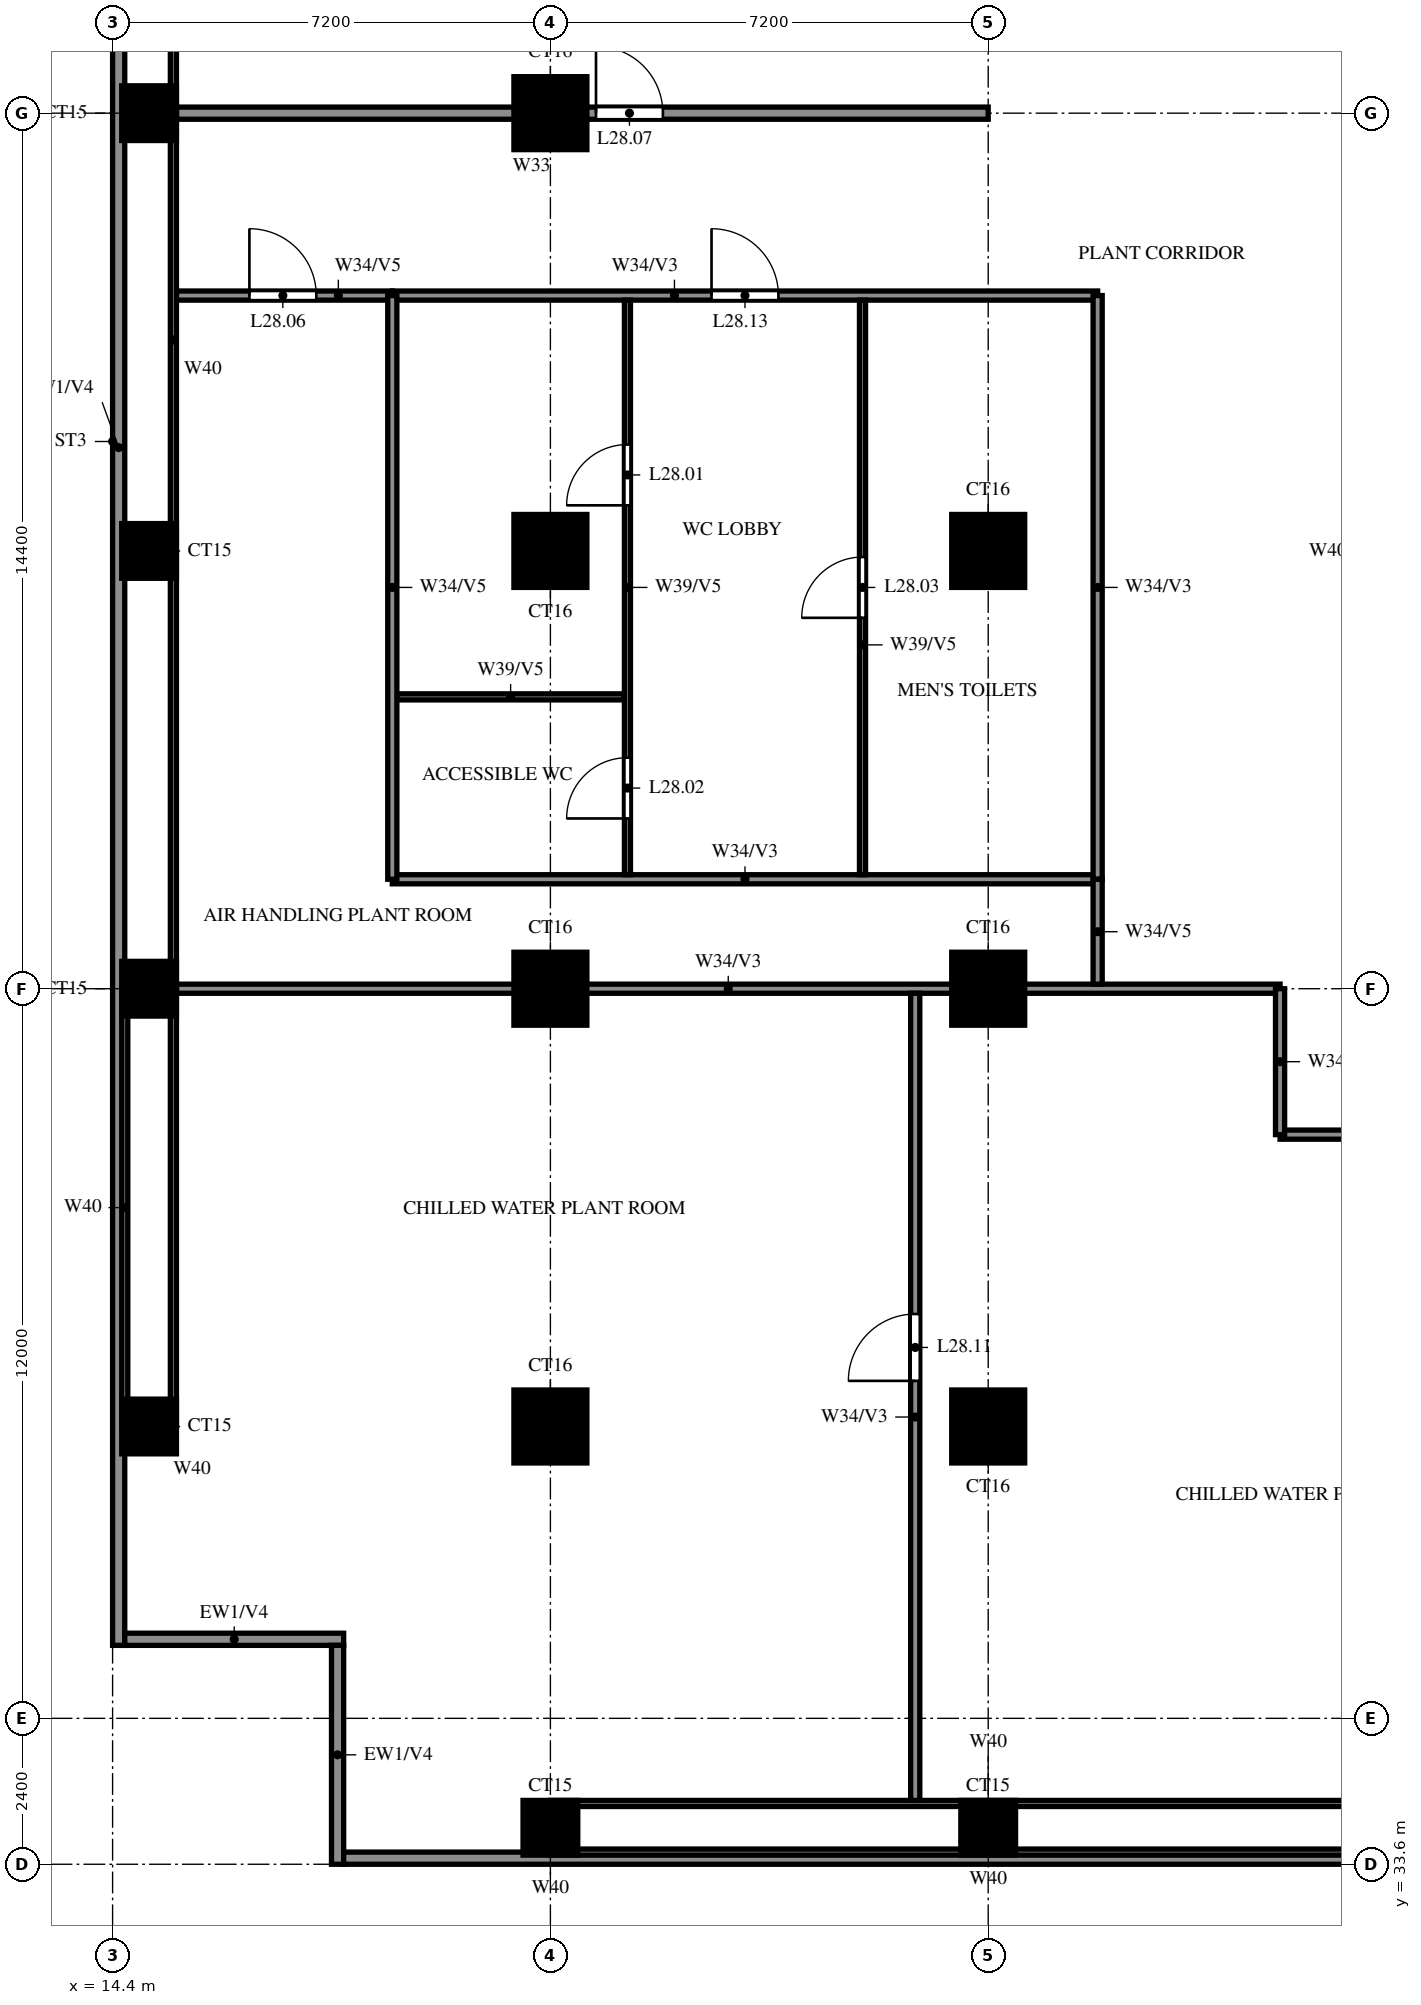
"""IFC4 building model, lengths in metres.
Left out: names, types, materials, properties, quantities, classifications, styles, units other than length and angle.
Written with IfcOpenShell. Run it as: python <this file> out.ifc"""

import sys

from ifc_helpers import new_model, si_unit, direction, frame, frame_2d, origin, origin_2d, place, context, subcontext, project, spatial, rectangle, extrude, source, transform, mapped, element, fill, save


model = new_model("IFC4")
c1 = context("Model", 3, precision=1e-05, world=origin(), true_north=direction((0.0, 1.0)))
c2 = subcontext(c1, "Body", "Model", "MODEL_VIEW")
j1 = project(units=[si_unit("LENGTHUNIT", "METRE"), si_unit("PLANEANGLEUNIT", "RADIAN")], contexts=[c1])
p1 = place(None, origin())
s1 = spatial("IfcSite", under=j1, at=p1, CompositionType="ELEMENT")
p2 = place(p1, origin())
s2 = spatial("IfcBuilding", under=s1, at=p2, CompositionType="ELEMENT")
p3 = place(p2, frame((0.0, 0.0, 107.5)))
s3 = spatial("IfcBuildingStorey", under=s2, at=p3, CompositionType="ELEMENT", Elevation=107.5)
m1 = source(origin(), c2, "Body", "SweptSolid", [
    extrude(rectangle(XDim=0.9, YDim=0.9, at=origin_2d()), origin(), (0.0, 0.0, 1.0), 5.2),
])
for number, where, z_axis, x_axis in (
    (1, (21.6, 34.2, 0.0), (0.0, 0.0, 1.0), (1.0, 0.0, 0.0)),
    (2, (28.8, 34.2, 0.0), (0.0, 0.0, 1.0), (1.0, 0.0, 0.0)),
    (3, (15.0, 40.8, 0.0), (0.0, 0.0, 1.0), (1.0, 0.0, 0.0)),
):
    element("IfcColumn", number, at=place(p3, frame(where, z_axis=z_axis, x_axis=x_axis)), inside=s3, PredefinedType="COLUMN", context=c2, shape_type="MappedRepresentation", body=[
        mapped(m1, transform((0.0, 0.0, 0.0))),
    ])
m2 = source(origin(), c2, "Body", "SweptSolid", [
    extrude(rectangle(XDim=1.2, YDim=1.2, at=origin_2d()), origin(), (0.0, 0.0, 1.0), 5.2),
])
for number, where, z_axis, x_axis in (
    (4, (21.6, 40.8, 0.0), (0.0, 0.0, 1.0), (1.0, 0.0, 0.0)),
    (5, (28.8, 40.8, 0.0), (0.0, 0.0, 1.0), (1.0, 0.0, 0.0)),
):
    element("IfcColumn", number, at=place(p3, frame(where, z_axis=z_axis, x_axis=x_axis)), inside=s3, PredefinedType="COLUMN", context=c2, shape_type="MappedRepresentation", body=[
        mapped(m2, transform((0.0, 0.0, 0.0))),
    ])
p4 = place(p3, frame((15.0, 48.0, 0.0), z_axis=(0.0, 0.0, 1.0), x_axis=(1.0, 0.0, 0.0)))
e6 = element("IfcColumn", 6, at=p4, inside=s3, PredefinedType="COLUMN", context=c2, shape_type="MappedRepresentation", body=[
    mapped(m1, transform((0.0, 0.0, 0.0))),
])
for number, where, z_axis, x_axis in (
    (7, (21.6, 48.0, 0.0), (0.0, 0.0, 1.0), (1.0, 0.0, 0.0)),
    (8, (28.8, 48.0, 0.0), (0.0, 0.0, 1.0), (1.0, 0.0, 0.0)),
):
    element("IfcColumn", number, at=place(p3, frame(where, z_axis=z_axis, x_axis=x_axis)), inside=s3, PredefinedType="COLUMN", context=c2, shape_type="MappedRepresentation", body=[
        mapped(m2, transform((0.0, 0.0, 0.0))),
    ])
p5 = place(p3, frame((15.0, 55.2, 0.0), z_axis=(0.0, 0.0, 1.0), x_axis=(1.0, 0.0, 0.0)))
e9 = element("IfcColumn", 9, at=p5, inside=s3, PredefinedType="COLUMN", context=c2, shape_type="MappedRepresentation", body=[
    mapped(m1, transform((0.0, 0.0, 0.0))),
])
for number, where, z_axis, x_axis in (
    (10, (21.6, 55.2, 0.0), (0.0, 0.0, 1.0), (1.0, 0.0, 0.0)),
    (11, (28.8, 55.2, 0.0), (0.0, 0.0, 1.0), (1.0, 0.0, 0.0)),
):
    element("IfcColumn", number, at=place(p3, frame(where, z_axis=z_axis, x_axis=x_axis)), inside=s3, PredefinedType="COLUMN", context=c2, shape_type="MappedRepresentation", body=[
        mapped(m2, transform((0.0, 0.0, 0.0))),
    ])
p6 = place(p3, frame((15.0, 62.4, 0.0), z_axis=(0.0, 0.0, 1.0), x_axis=(1.0, 0.0, 0.0)))
e12 = element("IfcColumn", 12, at=p6, inside=s3, PredefinedType="COLUMN", context=c2, shape_type="MappedRepresentation", body=[
    mapped(m1, transform((0.0, 0.0, 0.0))),
])
p7 = place(p3, frame((21.6, 62.4, 0.0), z_axis=(0.0, 0.0, 1.0), x_axis=(1.0, 0.0, 0.0)))
e13 = element("IfcColumn", 13, at=p7, inside=s3, PredefinedType="COLUMN", context=c2, shape_type="MappedRepresentation", body=[
    mapped(m2, transform((0.0, 0.0, 0.0))),
])
p8 = place(p3, frame((14.5, 76.6, 0.0), z_axis=(0.0, 0.0, 1.0), x_axis=(0.0, -1.0, 0.0)))
e14 = element("IfcWall", 14, at=p8, inside=s3, PredefinedType="SOLIDWALL", context=c2, shape_type="SweptSolid", body=[
    extrude(rectangle(XDim=39.4, YDim=0.2, at=frame_2d((19.7, 0.0))), origin(), (0.0, 0.0, 1.0), 5.2),
])
for number, where, z_axis, x_axis in (
    (15, (14.6, 37.3, 0.0), (0.0, 0.0, 1.0), (1.0, 0.0, 0.0)),
    (16, (18.1, 37.2, 0.0), (0.0, 0.0, 1.0), (0.0, -1.0, 0.0)),
):
    element("IfcWall", number, at=place(p3, frame(where, z_axis=z_axis, x_axis=x_axis)), inside=s3, PredefinedType="SOLIDWALL", context=c2, shape_type="SweptSolid", body=[
        extrude(rectangle(XDim=3.6, YDim=0.2, at=frame_2d((1.8, 0.0))), origin(), (0.0, 0.0, 1.0), 5.2),
    ])
p9 = place(p3, frame((18.2, 33.7, 0.0), z_axis=(0.0, 0.0, 1.0), x_axis=(1.0, 0.0, 0.0)))
e17 = element("IfcWall", 17, at=p9, inside=s3, PredefinedType="SOLIDWALL", context=c2, shape_type="SweptSolid", body=[
    extrude(rectangle(XDim=23.8, YDim=0.2, at=frame_2d((11.9, 0.0))), origin(), (0.0, 0.0, 1.0), 5.2),
])
for number, where, z_axis, x_axis in (
    (18, (21.6, 33.8, 0.0), (0.0, 0.0, 1.0), (1.0, 0.0, 0.0)),
    (19, (21.6, 34.6, 0.0), (0.0, 0.0, 1.0), (1.0, 0.0, 0.0)),
):
    element("IfcWall", number, at=place(p3, frame(where, z_axis=z_axis, x_axis=x_axis)), inside=s3, PredefinedType="PARTITIONING", context=c2, shape_type="SweptSolid", body=[
        extrude(rectangle(XDim=14.4, YDim=0.1, at=frame_2d((7.2, 0.0))), origin(), (0.0, 0.0, 1.0), 5.2),
    ])
p10 = place(p3, frame((14.6, 40.8, 0.0), z_axis=(0.0, 0.0, 1.0), x_axis=(1.0, 0.0, 0.0)))
e20 = element("IfcWall", 20, at=p10, inside=s3, PredefinedType="PARTITIONING", context=c2, shape_type="SweptSolid", body=[
    extrude(rectangle(XDim=0.8, YDim=0.1, at=frame_2d((0.4, 0.0))), origin(), (0.0, 0.0, 1.0), 5.2),
])
p11 = place(p3, frame((33.6, 45.6, 0.0), z_axis=(0.0, 0.0, 1.0), x_axis=(1.0, 0.0, 0.0)))
e21 = element("IfcWall", 21, at=p11, inside=s3, PredefinedType="PARTITIONING", context=c2, shape_type="SweptSolid", body=[
    extrude(rectangle(XDim=7.2, YDim=0.15, at=frame_2d((3.6, 0.0))), origin(), (0.0, 0.0, 1.0), 4.3),
])
p12 = place(p3, frame((15.45, 48.0, 0.0), z_axis=(0.0, 0.0, 1.0), x_axis=(1.0, 0.0, 0.0)))
e22 = element("IfcWall", 22, at=p12, inside=s3, PredefinedType="PARTITIONING", context=c2, shape_type="SweptSolid", body=[
    extrude(rectangle(XDim=18.15, YDim=0.15, at=frame_2d((9.075, 0.0))), origin(), (0.0, 0.0, 1.0), 4.3),
])
p13 = place(p3, frame((19.0, 49.8, 0.0), z_axis=(0.0, 0.0, 1.0), x_axis=(1.0, 0.0, 0.0)))
e23 = element("IfcWall", 23, at=p13, inside=s3, PredefinedType="PARTITIONING", context=c2, shape_type="SweptSolid", body=[
    extrude(rectangle(XDim=11.6, YDim=0.15, at=frame_2d((5.8, 0.0))), origin(), (0.0, 0.0, 1.0), 4.3),
])
p14 = place(p3, frame((19.075, 52.8, 0.0), z_axis=(0.0, 0.0, 1.0), x_axis=(1.0, 0.0, 0.0)))
e24 = element("IfcWall", 24, at=p14, inside=s3, PredefinedType="PARTITIONING", context=c2, shape_type="SweptSolid", body=[
    extrude(rectangle(XDim=3.742, YDim=0.1, at=frame_2d((1.871, 0.0))), origin(), (0.0, 0.0, 1.0), 4.3),
])
p15 = place(p3, frame((19.0, 59.4, 0.0), z_axis=(0.0, 0.0, 1.0), x_axis=(1.0, 0.0, 0.0)))
e25 = element("IfcWall", 25, at=p15, inside=s3, PredefinedType="PARTITIONING", context=c2, shape_type="SweptSolid", body=[
    extrude(rectangle(XDim=11.6, YDim=0.15, at=frame_2d((5.8, 0.0))), origin(), (0.0, 0.0, 1.0), 4.3),
])
p16 = place(p15, frame((5.25, 0.0, 0.0)))
e26 = element("IfcOpeningElement", 26, at=p16, cuts=e25, PredefinedType="OPENING", context=c2, shape_type="SweptSolid", body=[
    extrude(rectangle(XDim=1.1, YDim=2.1, at=frame_2d((0.55, 1.05))), frame((0.0, 0.085, 0.0), z_axis=(0.0, -1.0, 0.0), x_axis=(1.0, 0.0, 0.0)), (0.0, 0.0, 1.0), 0.17),
])
p17 = place(p3, frame((15.45, 59.4, 0.0), z_axis=(0.0, 0.0, 1.0), x_axis=(1.0, 0.0, 0.0)))
e27 = element("IfcWall", 27, at=p17, inside=s3, PredefinedType="PARTITIONING", context=c2, shape_type="SweptSolid", body=[
    extrude(rectangle(XDim=3.55, YDim=0.15, at=frame_2d((1.775, 0.0))), origin(), (0.0, 0.0, 1.0), 5.2),
])
p18 = place(p17, frame((1.2, 0.0, 0.0)))
e28 = element("IfcOpeningElement", 28, at=p18, cuts=e27, PredefinedType="OPENING", context=c2, shape_type="SweptSolid", body=[
    extrude(rectangle(XDim=1.1, YDim=2.1, at=frame_2d((0.55, 1.05))), frame((0.0, 0.085, 0.0), z_axis=(0.0, -1.0, 0.0), x_axis=(1.0, 0.0, 0.0)), (0.0, 0.0, 1.0), 0.17),
])
p19 = place(p3, frame((15.45, 62.4, 0.0), z_axis=(0.0, 0.0, 1.0), x_axis=(1.0, 0.0, 0.0)))
e29 = element("IfcWall", 29, at=p19, inside=s3, PredefinedType="SOLIDWALL", context=c2, shape_type="SweptSolid", body=[
    extrude(rectangle(XDim=13.35, YDim=0.2, at=frame_2d((6.675, 0.0))), origin(), (0.0, 0.0, 1.0), 5.2),
])
p20 = place(p19, frame((6.9, 0.0, 0.0)))
e30 = element("IfcOpeningElement", 30, at=p20, cuts=e29, PredefinedType="OPENING", context=c2, shape_type="SweptSolid", body=[
    extrude(rectangle(XDim=1.1, YDim=2.1, at=frame_2d((0.55, 1.05))), frame((0.0, 0.11, 0.0), z_axis=(0.0, -1.0, 0.0), x_axis=(1.0, 0.0, 0.0)), (0.0, 0.0, 1.0), 0.22),
])
p21 = place(p3, frame((14.6, 40.8, 0.0), z_axis=(0.0, 0.0, 1.0), x_axis=(0.0, 1.0, 0.0)))
e31 = element("IfcWall", 31, at=p21, inside=s3, PredefinedType="PARTITIONING", context=c2, shape_type="SweptSolid", body=[
    extrude(rectangle(XDim=7.2, YDim=0.1, at=frame_2d((3.6, 0.0))), origin(), (0.0, 0.0, 1.0), 5.2),
])
p22 = place(p3, frame((15.4, 40.8, 0.0), z_axis=(0.0, 0.0, 1.0), x_axis=(0.0, 1.0, 0.0)))
e32 = element("IfcWall", 32, at=p22, inside=s3, PredefinedType="PARTITIONING", context=c2, shape_type="SweptSolid", body=[
    extrude(rectangle(XDim=35.742, YDim=0.1, at=frame_2d((17.871, 0.0))), origin(), (0.0, 0.0, 1.0), 5.2),
])
p23 = place(p3, frame((19.0, 49.8, 0.0), z_axis=(0.0, 0.0, 1.0), x_axis=(0.0, 1.0, 0.0)))
e33 = element("IfcWall", 33, at=p23, inside=s3, PredefinedType="PARTITIONING", context=c2, shape_type="SweptSolid", body=[
    extrude(rectangle(XDim=9.6, YDim=0.15, at=frame_2d((4.8, 0.0))), origin(), (0.0, 0.0, 1.0), 5.2),
])
p24 = place(p3, frame((21.6, 33.8, 0.0), z_axis=(0.0, 0.0, 1.0), x_axis=(0.0, 1.0, 0.0)))
e34 = element("IfcWall", 34, at=p24, inside=s3, PredefinedType="PARTITIONING", context=c2, shape_type="SweptSolid", body=[
    extrude(rectangle(XDim=0.8, YDim=0.1, at=frame_2d((0.4, 0.0))), origin(), (0.0, 0.0, 1.0), 5.2),
])
p25 = place(p3, frame((22.867, 49.875, 0.0), z_axis=(0.0, 0.0, 1.0), x_axis=(0.0, 1.0, 0.0)))
e35 = element("IfcWall", 35, at=p25, inside=s3, PredefinedType="PARTITIONING", context=c2, shape_type="SweptSolid", body=[
    extrude(rectangle(XDim=9.45, YDim=0.1, at=frame_2d((4.725, 0.0))), origin(), (0.0, 0.0, 1.0), 4.3),
])
p26 = place(p25, frame((6.075, 0.0, 0.0)))
e36 = element("IfcOpeningElement", 36, at=p26, cuts=e35, PredefinedType="OPENING", context=c2, shape_type="SweptSolid", body=[
    extrude(rectangle(XDim=1.0, YDim=2.1, at=frame_2d((0.5, 1.05))), frame((0.0, 0.06, 0.0), z_axis=(0.0, -1.0, 0.0), x_axis=(1.0, 0.0, 0.0)), (0.0, 0.0, 1.0), 0.12),
])
p27 = place(p25, frame((0.925, 0.0, 0.0)))
e37 = element("IfcOpeningElement", 37, at=p27, cuts=e35, PredefinedType="OPENING", context=c2, shape_type="SweptSolid", body=[
    extrude(rectangle(XDim=1.0, YDim=2.1, at=frame_2d((0.5, 1.05))), frame((0.0, 0.06, 0.0), z_axis=(0.0, -1.0, 0.0), x_axis=(1.0, 0.0, 0.0)), (0.0, 0.0, 1.0), 0.12),
])
p28 = place(p3, frame((26.733, 49.875, 0.0), z_axis=(0.0, 0.0, 1.0), x_axis=(0.0, 1.0, 0.0)))
e38 = element("IfcWall", 38, at=p28, inside=s3, PredefinedType="PARTITIONING", context=c2, shape_type="SweptSolid", body=[
    extrude(rectangle(XDim=9.45, YDim=0.1, at=frame_2d((4.725, 0.0))), origin(), (0.0, 0.0, 1.0), 4.3),
])
p29 = place(p28, frame((4.225, 0.0, 0.0)))
e39 = element("IfcOpeningElement", 39, at=p29, cuts=e38, PredefinedType="OPENING", context=c2, shape_type="SweptSolid", body=[
    extrude(rectangle(XDim=1.0, YDim=2.1, at=frame_2d((0.5, 1.05))), frame((0.0, 0.06, 0.0), z_axis=(0.0, -1.0, 0.0), x_axis=(1.0, 0.0, 0.0)), (0.0, 0.0, 1.0), 0.12),
])
p30 = place(p3, frame((27.6, 34.65, 0.0), z_axis=(0.0, 0.0, 1.0), x_axis=(0.0, 1.0, 0.0)))
e40 = element("IfcWall", 40, at=p30, inside=s3, PredefinedType="PARTITIONING", context=c2, shape_type="SweptSolid", body=[
    extrude(rectangle(XDim=13.275, YDim=0.15, at=frame_2d((6.638, 0.0))), origin(), (0.0, 0.0, 1.0), 4.3),
])
p31 = place(p30, frame((6.9, 0.0, 0.0)))
e41 = element("IfcOpeningElement", 41, at=p31, cuts=e40, PredefinedType="OPENING", context=c2, shape_type="SweptSolid", body=[
    extrude(rectangle(XDim=1.1, YDim=2.1, at=frame_2d((0.55, 1.05))), frame((0.0, 0.085, 0.0), z_axis=(0.0, -1.0, 0.0), x_axis=(1.0, 0.0, 0.0)), (0.0, 0.0, 1.0), 0.17),
])
p32 = place(p3, frame((30.6, 49.8, 0.0), z_axis=(0.0, 0.0, 1.0), x_axis=(0.0, 1.0, 0.0)))
e42 = element("IfcWall", 42, at=p32, inside=s3, PredefinedType="PARTITIONING", context=c2, shape_type="SweptSolid", body=[
    extrude(rectangle(XDim=9.6, YDim=0.15, at=frame_2d((4.8, 0.0))), origin(), (0.0, 0.0, 1.0), 4.3),
])
p33 = place(p3, frame((30.6, 48.075, 0.0), z_axis=(0.0, 0.0, 1.0), x_axis=(0.0, 1.0, 0.0)))
e43 = element("IfcWall", 43, at=p33, inside=s3, PredefinedType="PARTITIONING", context=c2, shape_type="SweptSolid", body=[
    extrude(rectangle(XDim=1.725, YDim=0.15, at=frame_2d((0.863, 0.0))), origin(), (0.0, 0.0, 1.0), 5.2),
])
p34 = place(p3, frame((33.6, 45.6, 0.0), z_axis=(0.0, 0.0, 1.0), x_axis=(0.0, 1.0, 0.0)))
e44 = element("IfcWall", 44, at=p34, inside=s3, PredefinedType="PARTITIONING", context=c2, shape_type="SweptSolid", body=[
    extrude(rectangle(XDim=2.4, YDim=0.15, at=frame_2d((1.2, 0.0))), origin(), (0.0, 0.0, 1.0), 4.3),
])
p35 = place(p26, origin())
e45 = element("IfcDoor", 45, at=p35, inside=s3, OperationType="SINGLE_SWING_RIGHT", PredefinedType="DOOR", context=c2, shape_type="SweptSolid", body=[
    extrude(rectangle(XDim=1.0, YDim=2.1, at=frame_2d((0.5, 1.05))), frame((0.0, 0.025, 0.0), z_axis=(0.0, -1.0, 0.0), x_axis=(1.0, 0.0, 0.0)), (0.0, 0.0, 1.0), 0.05),
])
fill(e36, e45)
p36 = place(p27, origin())
e46 = element("IfcDoor", 46, at=p36, inside=s3, OperationType="SINGLE_SWING_LEFT", PredefinedType="DOOR", context=c2, shape_type="SweptSolid", body=[
    extrude(rectangle(XDim=1.0, YDim=2.1, at=frame_2d((0.5, 1.05))), frame((0.0, 0.025, 0.0), z_axis=(0.0, -1.0, 0.0), x_axis=(1.0, 0.0, 0.0)), (0.0, 0.0, 1.0), 0.05),
])
fill(e37, e46)
p37 = place(p29, origin())
e47 = element("IfcDoor", 47, at=p37, inside=s3, OperationType="SINGLE_SWING_LEFT", PredefinedType="DOOR", context=c2, shape_type="SweptSolid", body=[
    extrude(rectangle(XDim=1.0, YDim=2.1, at=frame_2d((0.5, 1.05))), frame((0.0, 0.025, 0.0), z_axis=(0.0, -1.0, 0.0), x_axis=(1.0, 0.0, 0.0)), (0.0, 0.0, 1.0), 0.05),
])
fill(e39, e47)
p38 = place(p18, origin())
e48 = element("IfcDoor", 48, at=p38, inside=s3, OperationType="SINGLE_SWING_LEFT", PredefinedType="DOOR", context=c2, shape_type="SweptSolid", body=[
    extrude(rectangle(XDim=1.1, YDim=2.1, at=frame_2d((0.55, 1.05))), frame((0.0, 0.025, 0.0), z_axis=(0.0, -1.0, 0.0), x_axis=(1.0, 0.0, 0.0)), (0.0, 0.0, 1.0), 0.05),
])
fill(e28, e48)
p39 = place(p20, origin())
e49 = element("IfcDoor", 49, at=p39, inside=s3, OperationType="SINGLE_SWING_RIGHT", PredefinedType="DOOR", context=c2, shape_type="SweptSolid", body=[
    extrude(rectangle(XDim=1.1, YDim=2.1, at=frame_2d((0.55, 1.05))), frame((0.0, 0.025, 0.0), z_axis=(0.0, -1.0, 0.0), x_axis=(1.0, 0.0, 0.0)), (0.0, 0.0, 1.0), 0.05),
])
fill(e30, e49)
p40 = place(p31, origin())
e50 = element("IfcDoor", 50, at=p40, inside=s3, OperationType="SINGLE_SWING_RIGHT", PredefinedType="DOOR", context=c2, shape_type="SweptSolid", body=[
    extrude(rectangle(XDim=1.1, YDim=2.1, at=frame_2d((0.55, 1.05))), frame((0.0, 0.025, 0.0), z_axis=(0.0, -1.0, 0.0), x_axis=(1.0, 0.0, 0.0)), (0.0, 0.0, 1.0), 0.05),
])
fill(e41, e50)
p41 = place(p16, origin())
e51 = element("IfcDoor", 51, at=p41, inside=s3, OperationType="SINGLE_SWING_RIGHT", PredefinedType="DOOR", context=c2, shape_type="SweptSolid", body=[
    extrude(rectangle(XDim=1.1, YDim=2.1, at=frame_2d((0.55, 1.05))), frame((0.0, 0.025, 0.0), z_axis=(0.0, -1.0, 0.0), x_axis=(1.0, 0.0, 0.0)), (0.0, 0.0, 1.0), 0.05),
])
fill(e26, e51)
save(model, sys.argv[1])
